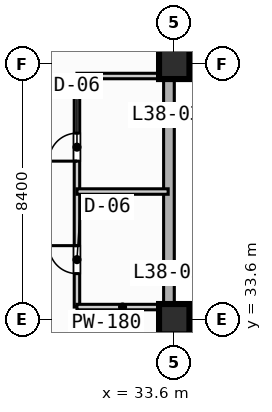
"""IFC4 building model, lengths in metres.
Left out: names, types, materials, properties, quantities, classifications, styles, units other than length and angle.
Written with IfcOpenShell. Run it as: python <this file> out.ifc"""

import sys

from ifc_helpers import new_model, si_unit, direction, frame, frame_2d, origin, origin_2d, place, context, subcontext, project, spatial, rectangle, extrude, element, fill, save


model = new_model("IFC4")
c1 = context("Model", 3, precision=1e-05, world=origin(), true_north=direction((0.0, 1.0)))
c2 = subcontext(c1, "Body", "Model", "MODEL_VIEW")
j1 = project(units=[si_unit("LENGTHUNIT", "METRE"), si_unit("PLANEANGLEUNIT", "RADIAN")], contexts=[c1])
p1 = place(None, origin())
s1 = spatial("IfcSite", under=j1, at=p1, CompositionType="ELEMENT")
p2 = place(p1, origin())
s2 = spatial("IfcBuilding", under=s1, at=p2, CompositionType="ELEMENT")
p3 = place(p2, frame((0.0, 0.0, 157.6)))
s3 = spatial("IfcBuildingStorey", under=s2, at=p3, CompositionType="ELEMENT", Elevation=157.6)
for number, where, z_axis, x_axis in (
    (1, (33.6, 33.6, 0.0), (0.0, 0.0, 1.0), (1.0, 0.0, 0.0)),
    (2, (33.6, 42.0, 0.0), (0.0, 0.0, 1.0), (1.0, 0.0, 0.0)),
):
    element("IfcColumn", number, at=place(p3, frame(where, z_axis=z_axis, x_axis=x_axis)), inside=s3, PredefinedType="COLUMN", context=c2, shape_type="SweptSolid", body=[
        extrude(rectangle(XDim=1.0, YDim=1.0, at=origin_2d()), origin(), (0.0, 0.0, 1.0), 4.4),
    ])
p4 = place(p3, frame((33.425, 72.425, 0.0), z_axis=(0.0, 0.0, 1.0), x_axis=(0.0, -1.0, 0.0)))
e3 = element("IfcWall", 3, at=p4, inside=s3, PredefinedType="STANDARD", context=c2, shape_type="SweptSolid", body=[
    extrude(rectangle(XDim=39.0, YDim=0.35, at=frame_2d((19.5, 0.0))), origin(), (0.0, 0.0, 1.0), 4.05),
])
p5 = place(p3, frame((33.425, 33.425, 0.0), z_axis=(0.0, 0.0, 1.0), x_axis=(1.0, 0.0, 0.0)))
e4 = element("IfcWall", 4, at=p5, inside=s3, PredefinedType="STANDARD", context=c2, shape_type="SweptSolid", body=[
    extrude(rectangle(XDim=39.0, YDim=0.35, at=frame_2d((19.5, 0.0))), origin(), (0.0, 0.0, 1.0), 4.05),
])
p6 = place(p5, frame((12.075, 0.0, 0.0)))
e5 = element("IfcOpeningElement", 5, at=p6, cuts=e4, PredefinedType="OPENING", context=c2, shape_type="SweptSolid", body=[
    extrude(rectangle(XDim=1.4, YDim=2.2, at=frame_2d((0.7, 1.1))), frame((0.0, 0.185, 0.0), z_axis=(0.0, -1.0, 0.0), x_axis=(1.0, 0.0, 0.0)), (0.0, 0.0, 1.0), 0.37),
])
p7 = place(p3, frame((30.4, 34.0, 0.0), z_axis=(0.0, 0.0, 1.0), x_axis=(0.0, 1.0, 0.0)))
e6 = element("IfcWall", 6, at=p7, inside=s3, PredefinedType="PLUMBINGWALL", context=c2, shape_type="SweptSolid", body=[
    extrude(rectangle(XDim=7.6, YDim=0.18, at=frame_2d((3.8, 0.0))), origin(), (0.0, 0.0, 1.0), 4.05),
])
p8 = place(p7, frame((1.1, 0.0, 0.0)))
e7 = element("IfcOpeningElement", 7, at=p8, cuts=e6, PredefinedType="OPENING", context=c2, shape_type="SweptSolid", body=[
    extrude(rectangle(XDim=0.92, YDim=2.1, at=frame_2d((0.46, 1.05))), frame((0.0, 0.1, 0.0), z_axis=(0.0, -1.0, 0.0), x_axis=(1.0, 0.0, 0.0)), (0.0, 0.0, 1.0), 0.2),
])
p9 = place(p7, frame((4.8, 0.0, 0.0)))
e8 = element("IfcOpeningElement", 8, at=p9, cuts=e6, PredefinedType="OPENING", context=c2, shape_type="SweptSolid", body=[
    extrude(rectangle(XDim=0.92, YDim=2.1, at=frame_2d((0.46, 1.05))), frame((0.0, 0.1, 0.0), z_axis=(0.0, -1.0, 0.0), x_axis=(1.0, 0.0, 0.0)), (0.0, 0.0, 1.0), 0.2),
])
for number, where, z_axis, x_axis in (
    (9, (30.4, 34.0, 0.0), (0.0, 0.0, 1.0), (1.0, 0.0, 0.0)),
    (10, (30.4, 37.8, 0.0), (0.0, 0.0, 1.0), (1.0, 0.0, 0.0)),
    (11, (30.4, 41.6, 0.0), (0.0, 0.0, 1.0), (1.0, 0.0, 0.0)),
):
    element("IfcWall", number, at=place(p3, frame(where, z_axis=z_axis, x_axis=x_axis)), inside=s3, PredefinedType="PLUMBINGWALL", context=c2, shape_type="SweptSolid", body=[
        extrude(rectangle(XDim=3.0, YDim=0.18, at=frame_2d((1.5, 0.0))), origin(), (0.0, 0.0, 1.0), 4.05),
    ])
p10 = place(p8, origin())
e12 = element("IfcDoor", 12, at=p10, inside=s3, OperationType="SINGLE_SWING_RIGHT", PredefinedType="DOOR", context=c2, shape_type="SweptSolid", body=[
    extrude(rectangle(XDim=0.92, YDim=2.1, at=frame_2d((0.46, 1.05))), frame((0.0, 0.025, 0.0), z_axis=(0.0, -1.0, 0.0), x_axis=(1.0, 0.0, 0.0)), (0.0, 0.0, 1.0), 0.05),
])
fill(e7, e12)
p11 = place(p9, origin())
e13 = element("IfcDoor", 13, at=p11, inside=s3, OperationType="SINGLE_SWING_LEFT", PredefinedType="DOOR", context=c2, shape_type="SweptSolid", body=[
    extrude(rectangle(XDim=0.92, YDim=2.1, at=frame_2d((0.46, 1.05))), frame((0.0, 0.025, 0.0), z_axis=(0.0, -1.0, 0.0), x_axis=(1.0, 0.0, 0.0)), (0.0, 0.0, 1.0), 0.05),
])
fill(e8, e13)
save(model, sys.argv[1])
